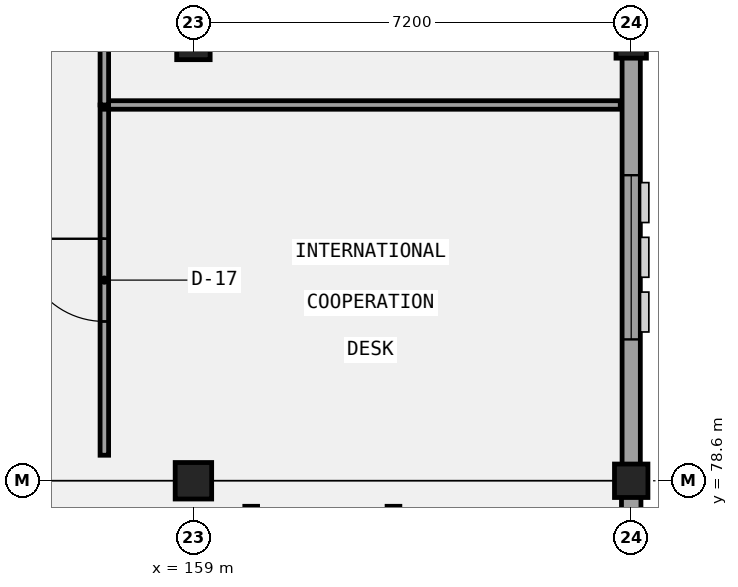
"""IFC4 building model, lengths in metres.
Left out: names, types, materials, properties, quantities, classifications, styles, units other than length and angle.
Written with IfcOpenShell. Run it as: python <this file> out.ifc"""

import sys

from ifc_helpers import new_model, si_unit, direction, frame, frame_2d, origin, origin_2d, place, context, subcontext, project, spatial, rectangle, extrude, element, fill, save


model = new_model("IFC4")
c1 = context("Model", 3, precision=1e-05, world=origin(), true_north=direction((0.0, 1.0)))
c2 = subcontext(c1, "Body", "Model", "MODEL_VIEW")
j1 = project(units=[si_unit("LENGTHUNIT", "METRE"), si_unit("PLANEANGLEUNIT", "RADIAN")], contexts=[c1])
p1 = place(None, origin())
s1 = spatial("IfcSite", under=j1, at=p1, CompositionType="ELEMENT")
p2 = place(p1, origin())
s2 = spatial("IfcBuilding", under=s1, at=p2, CompositionType="ELEMENT")
p3 = place(p2, frame((0.0, 0.0, 18.0)))
s3 = spatial("IfcBuildingStorey", under=s2, at=p3, CompositionType="ELEMENT", Elevation=18.0)
p4 = place(p3, frame((159.0, 78.6, 0.0), z_axis=(0.0, 0.0, 1.0), x_axis=(1.0, 0.0, 0.0)))
e1 = element("IfcColumn", 1, at=p4, inside=s3, PredefinedType="COLUMN", context=c2, shape_type="SweptSolid", body=[
    extrude(rectangle(XDim=0.6, YDim=0.6, at=origin_2d()), origin(), (0.0, 0.0, 1.0), 4.2),
])
for number, where, z_axis, x_axis in (
    (2, (159.0, 85.8, 0.0), (0.0, 0.0, 1.0), (1.0, 0.0, 0.0)),
    (3, (166.2, 78.6, 0.0), (0.0, 0.0, 1.0), (1.0, 0.0, 0.0)),
):
    element("IfcColumn", number, at=place(p3, frame(where, z_axis=z_axis, x_axis=x_axis)), inside=s3, PredefinedType="COLUMN", context=c2, shape_type="SweptSolid", body=[
        extrude(rectangle(XDim=0.55, YDim=0.55, at=origin_2d()), origin(), (0.0, 0.0, 1.0), 4.2),
    ])
p5 = place(p3, frame((166.2, 85.8, 0.0), z_axis=(0.0, 0.0, 1.0), x_axis=(1.0, 0.0, 0.0)))
e4 = element("IfcColumn", 4, at=p5, inside=s3, PredefinedType="COLUMN", context=c2, shape_type="SweptSolid", body=[
    extrude(rectangle(XDim=0.5, YDim=0.5, at=origin_2d()), origin(), (0.0, 0.0, 1.0), 4.2),
])
p6 = place(p3, frame((166.2, 49.99, 0.0), z_axis=(0.0, 0.0, 1.0), x_axis=(0.0, 1.0, 0.0)))
e5 = element("IfcWall", 5, at=p6, inside=s3, PredefinedType="SOLIDWALL", context=c2, shape_type="SweptSolid", body=[
    extrude(rectangle(XDim=28.45, YDim=0.32, at=frame_2d((14.225, 0.0))), origin(), (0.0, 0.0, 1.0), 3.09),
])
p7 = place(p6, frame((2.605, 0.0, 1.0)))
e6 = element("IfcOpeningElement", 6, at=p7, cuts=e5, PredefinedType="OPENING", context=c2, shape_type="SweptSolid", body=[
    extrude(rectangle(XDim=1.8, YDim=1.4, at=frame_2d((0.9, 0.7))), frame((0.0, 0.17, 0.0), z_axis=(0.0, -1.0, 0.0), x_axis=(1.0, 0.0, 0.0)), (0.0, 0.0, 1.0), 0.34),
])
p8 = place(p6, frame((9.71, 0.0, 1.0)))
e7 = element("IfcOpeningElement", 7, at=p8, cuts=e5, PredefinedType="OPENING", context=c2, shape_type="SweptSolid", body=[
    extrude(rectangle(XDim=1.8, YDim=1.4, at=frame_2d((0.9, 0.7))), frame((0.0, 0.17, 0.0), z_axis=(0.0, -1.0, 0.0), x_axis=(1.0, 0.0, 0.0)), (0.0, 0.0, 1.0), 0.34),
])
p9 = place(p6, frame((16.91, 0.0, 1.0)))
e8 = element("IfcOpeningElement", 8, at=p9, cuts=e5, PredefinedType="OPENING", context=c2, shape_type="SweptSolid", body=[
    extrude(rectangle(XDim=1.8, YDim=1.4, at=frame_2d((0.9, 0.7))), frame((0.0, 0.17, 0.0), z_axis=(0.0, -1.0, 0.0), x_axis=(1.0, 0.0, 0.0)), (0.0, 0.0, 1.0), 0.34),
])
p10 = place(p6, frame((24.03, 0.0, 1.0)))
e9 = element("IfcOpeningElement", 9, at=p10, cuts=e5, PredefinedType="OPENING", context=c2, shape_type="SweptSolid", body=[
    extrude(rectangle(XDim=1.8, YDim=1.4, at=frame_2d((0.9, 0.7))), frame((0.0, 0.17, 0.0), z_axis=(0.0, -1.0, 0.0), x_axis=(1.0, 0.0, 0.0)), (0.0, 0.0, 1.0), 0.34),
])
p11 = place(p3, frame((166.2, 78.75, 0.0), z_axis=(0.0, 0.0, 1.0), x_axis=(0.0, 1.0, 0.0)))
e10 = element("IfcWall", 10, at=p11, inside=s3, PredefinedType="SOLIDWALL", context=c2, shape_type="SweptSolid", body=[
    extrude(rectangle(XDim=35.1, YDim=0.3, at=frame_2d((17.55, 0.0))), origin(), (0.0, 0.0, 1.0), 2.94),
])
p12 = place(p11, frame((2.175, 0.0, 0.95)))
e11 = element("IfcOpeningElement", 11, at=p12, cuts=e10, PredefinedType="OPENING", context=c2, shape_type="SweptSolid", body=[
    extrude(rectangle(XDim=2.7, YDim=1.4, at=frame_2d((1.35, 0.7))), frame((0.0, 0.16, 0.0), z_axis=(0.0, -1.0, 0.0), x_axis=(1.0, 0.0, 0.0)), (0.0, 0.0, 1.0), 0.32),
])
p13 = place(p11, frame((9.3, 0.0, 0.95)))
e12 = element("IfcOpeningElement", 12, at=p13, cuts=e10, PredefinedType="OPENING", context=c2, shape_type="SweptSolid", body=[
    extrude(rectangle(XDim=2.7, YDim=1.65, at=frame_2d((1.35, 0.825))), frame((0.0, 0.16, 0.0), z_axis=(0.0, -1.0, 0.0), x_axis=(1.0, 0.0, 0.0)), (0.0, 0.0, 1.0), 0.32),
])
p14 = place(p11, frame((16.375, 0.0, 0.95)))
e13 = element("IfcOpeningElement", 13, at=p14, cuts=e10, PredefinedType="OPENING", context=c2, shape_type="SweptSolid", body=[
    extrude(rectangle(XDim=2.95, YDim=1.4, at=frame_2d((1.475, 0.7))), frame((0.0, 0.16, 0.0), z_axis=(0.0, -1.0, 0.0), x_axis=(1.0, 0.0, 0.0)), (0.0, 0.0, 1.0), 0.32),
])
p15 = place(p11, frame((23.575, 0.0, 0.95)))
e14 = element("IfcOpeningElement", 14, at=p15, cuts=e10, PredefinedType="OPENING", context=c2, shape_type="SweptSolid", body=[
    extrude(rectangle(XDim=2.95, YDim=1.65, at=frame_2d((1.475, 0.825))), frame((0.0, 0.16, 0.0), z_axis=(0.0, -1.0, 0.0), x_axis=(1.0, 0.0, 0.0)), (0.0, 0.0, 1.0), 0.32),
])
p16 = place(p11, frame((31.45, 0.0, 0.95)))
e15 = element("IfcOpeningElement", 15, at=p16, cuts=e10, PredefinedType="OPENING", context=c2, shape_type="SweptSolid", body=[
    extrude(rectangle(XDim=0.85, YDim=1.4, at=frame_2d((0.425, 0.7))), frame((0.0, 0.16, 0.0), z_axis=(0.0, -1.0, 0.0), x_axis=(1.0, 0.0, 0.0)), (0.0, 0.0, 1.0), 0.32),
])
p17 = place(p3, frame((157.535, 79.02, 0.0), z_axis=(0.0, 0.0, 1.0), x_axis=(0.0, 1.0, 0.0)))
e16 = element("IfcWall", 16, at=p17, inside=s3, PredefinedType="PARTITIONING", context=c2, shape_type="SweptSolid", body=[
    extrude(rectangle(XDim=5.76, YDim=0.14, at=frame_2d((2.88, 0.0))), origin(), (0.0, 0.0, 1.0), 3.94),
])
p18 = place(p17, frame((2.2, 0.0, 0.0)))
e17 = element("IfcOpeningElement", 17, at=p18, cuts=e16, PredefinedType="OPENING", context=c2, shape_type="SweptSolid", body=[
    extrude(rectangle(XDim=1.36, YDim=2.22, at=frame_2d((0.68, 1.11))), frame((0.0, 0.08, 0.0), z_axis=(0.0, -1.0, 0.0), x_axis=(1.0, 0.0, 0.0)), (0.0, 0.0, 1.0), 0.16),
])
p19 = place(p3, frame((157.535, 84.78, 0.0), z_axis=(0.0, 0.0, 1.0), x_axis=(1.0, 0.0, 0.0)))
e18 = element("IfcWall", 18, at=p19, inside=s3, PredefinedType="PARTITIONING", context=c2, shape_type="SweptSolid", body=[
    extrude(rectangle(XDim=8.485, YDim=0.14, at=frame_2d((4.243, 0.0))), origin(), (0.0, 0.0, 1.0), 3.94),
])
p20 = place(p3, frame((157.535, 84.78, 0.0), z_axis=(0.0, 0.0, 1.0), x_axis=(0.0, 1.0, 0.0)))
e19 = element("IfcWall", 19, at=p20, inside=s3, PredefinedType="PARTITIONING", context=c2, shape_type="SweptSolid", body=[
    extrude(rectangle(XDim=7.21, YDim=0.14, at=frame_2d((3.605, 0.0))), origin(), (0.0, 0.0, 1.0), 3.94),
])
p21 = place(p20, frame((2.925, 0.0, 0.0)))
e20 = element("IfcOpeningElement", 20, at=p21, cuts=e19, PredefinedType="OPENING", context=c2, shape_type="SweptSolid", body=[
    extrude(rectangle(XDim=1.36, YDim=2.35, at=frame_2d((0.68, 1.175))), frame((0.0, 0.08, 0.0), z_axis=(0.0, -1.0, 0.0), x_axis=(1.0, 0.0, 0.0)), (0.0, 0.0, 1.0), 0.16),
])
p22 = place(p3, frame((159.95, 71.248, 0.0), z_axis=(0.0, 0.0, 1.0), x_axis=(0.0, 1.0, 0.0)))
e21 = element("IfcWall", 21, at=p22, inside=s3, PredefinedType="PARTITIONING", context=c2, shape_type="SweptSolid", body=[
    extrude(rectangle(XDim=6.932, YDim=0.21, at=frame_2d((3.466, 0.0))), origin(), (0.0, 0.0, 1.0), 3.94),
])
p23 = place(p22, frame((2.916, 0.0, 0.0)))
e22 = element("IfcOpeningElement", 22, at=p23, cuts=e21, PredefinedType="OPENING", context=c2, shape_type="SweptSolid", body=[
    extrude(rectangle(XDim=1.1, YDim=2.35, at=frame_2d((0.55, 1.175))), frame((0.0, 0.115, 0.0), z_axis=(0.0, -1.0, 0.0), x_axis=(1.0, 0.0, 0.0)), (0.0, 0.0, 1.0), 0.23),
])
p24 = place(p3, frame((162.29, 71.248, 0.0), z_axis=(0.0, 0.0, 1.0), x_axis=(0.0, 1.0, 0.0)))
e23 = element("IfcWall", 23, at=p24, inside=s3, PredefinedType="PARTITIONING", context=c2, shape_type="SweptSolid", body=[
    extrude(rectangle(XDim=6.932, YDim=0.21, at=frame_2d((3.466, 0.0))), origin(), (0.0, 0.0, 1.0), 3.94),
])
p25 = place(p24, frame((2.786, 0.0, 0.0)))
e24 = element("IfcOpeningElement", 24, at=p25, cuts=e23, PredefinedType="OPENING", context=c2, shape_type="SweptSolid", body=[
    extrude(rectangle(XDim=1.36, YDim=2.1, at=frame_2d((0.68, 1.05))), frame((0.0, 0.115, 0.0), z_axis=(0.0, -1.0, 0.0), x_axis=(1.0, 0.0, 0.0)), (0.0, 0.0, 1.0), 0.23),
])
p26 = place(p12, origin())
e25 = element("IfcWindow", 25, at=p26, inside=s3, PartitioningType="SINGLE_PANEL", PredefinedType="WINDOW", context=c2, shape_type="SweptSolid", body=[
    extrude(rectangle(XDim=2.7, YDim=1.4, at=frame_2d((1.35, 0.7))), frame((0.0, 0.03, 0.0), z_axis=(0.0, -1.0, 0.0), x_axis=(1.0, 0.0, 0.0)), (0.0, 0.0, 1.0), 0.06),
])
fill(e11, e25)
p27 = place(p18, origin())
e26 = element("IfcDoor", 26, at=p27, inside=s3, OperationType="SINGLE_SWING_RIGHT", PredefinedType="DOOR", context=c2, shape_type="SweptSolid", body=[
    extrude(rectangle(XDim=1.36, YDim=2.22, at=frame_2d((0.68, 1.11))), frame((0.0, 0.025, 0.0), z_axis=(0.0, -1.0, 0.0), x_axis=(1.0, 0.0, 0.0)), (0.0, 0.0, 1.0), 0.05),
])
fill(e17, e26)
save(model, sys.argv[1])
